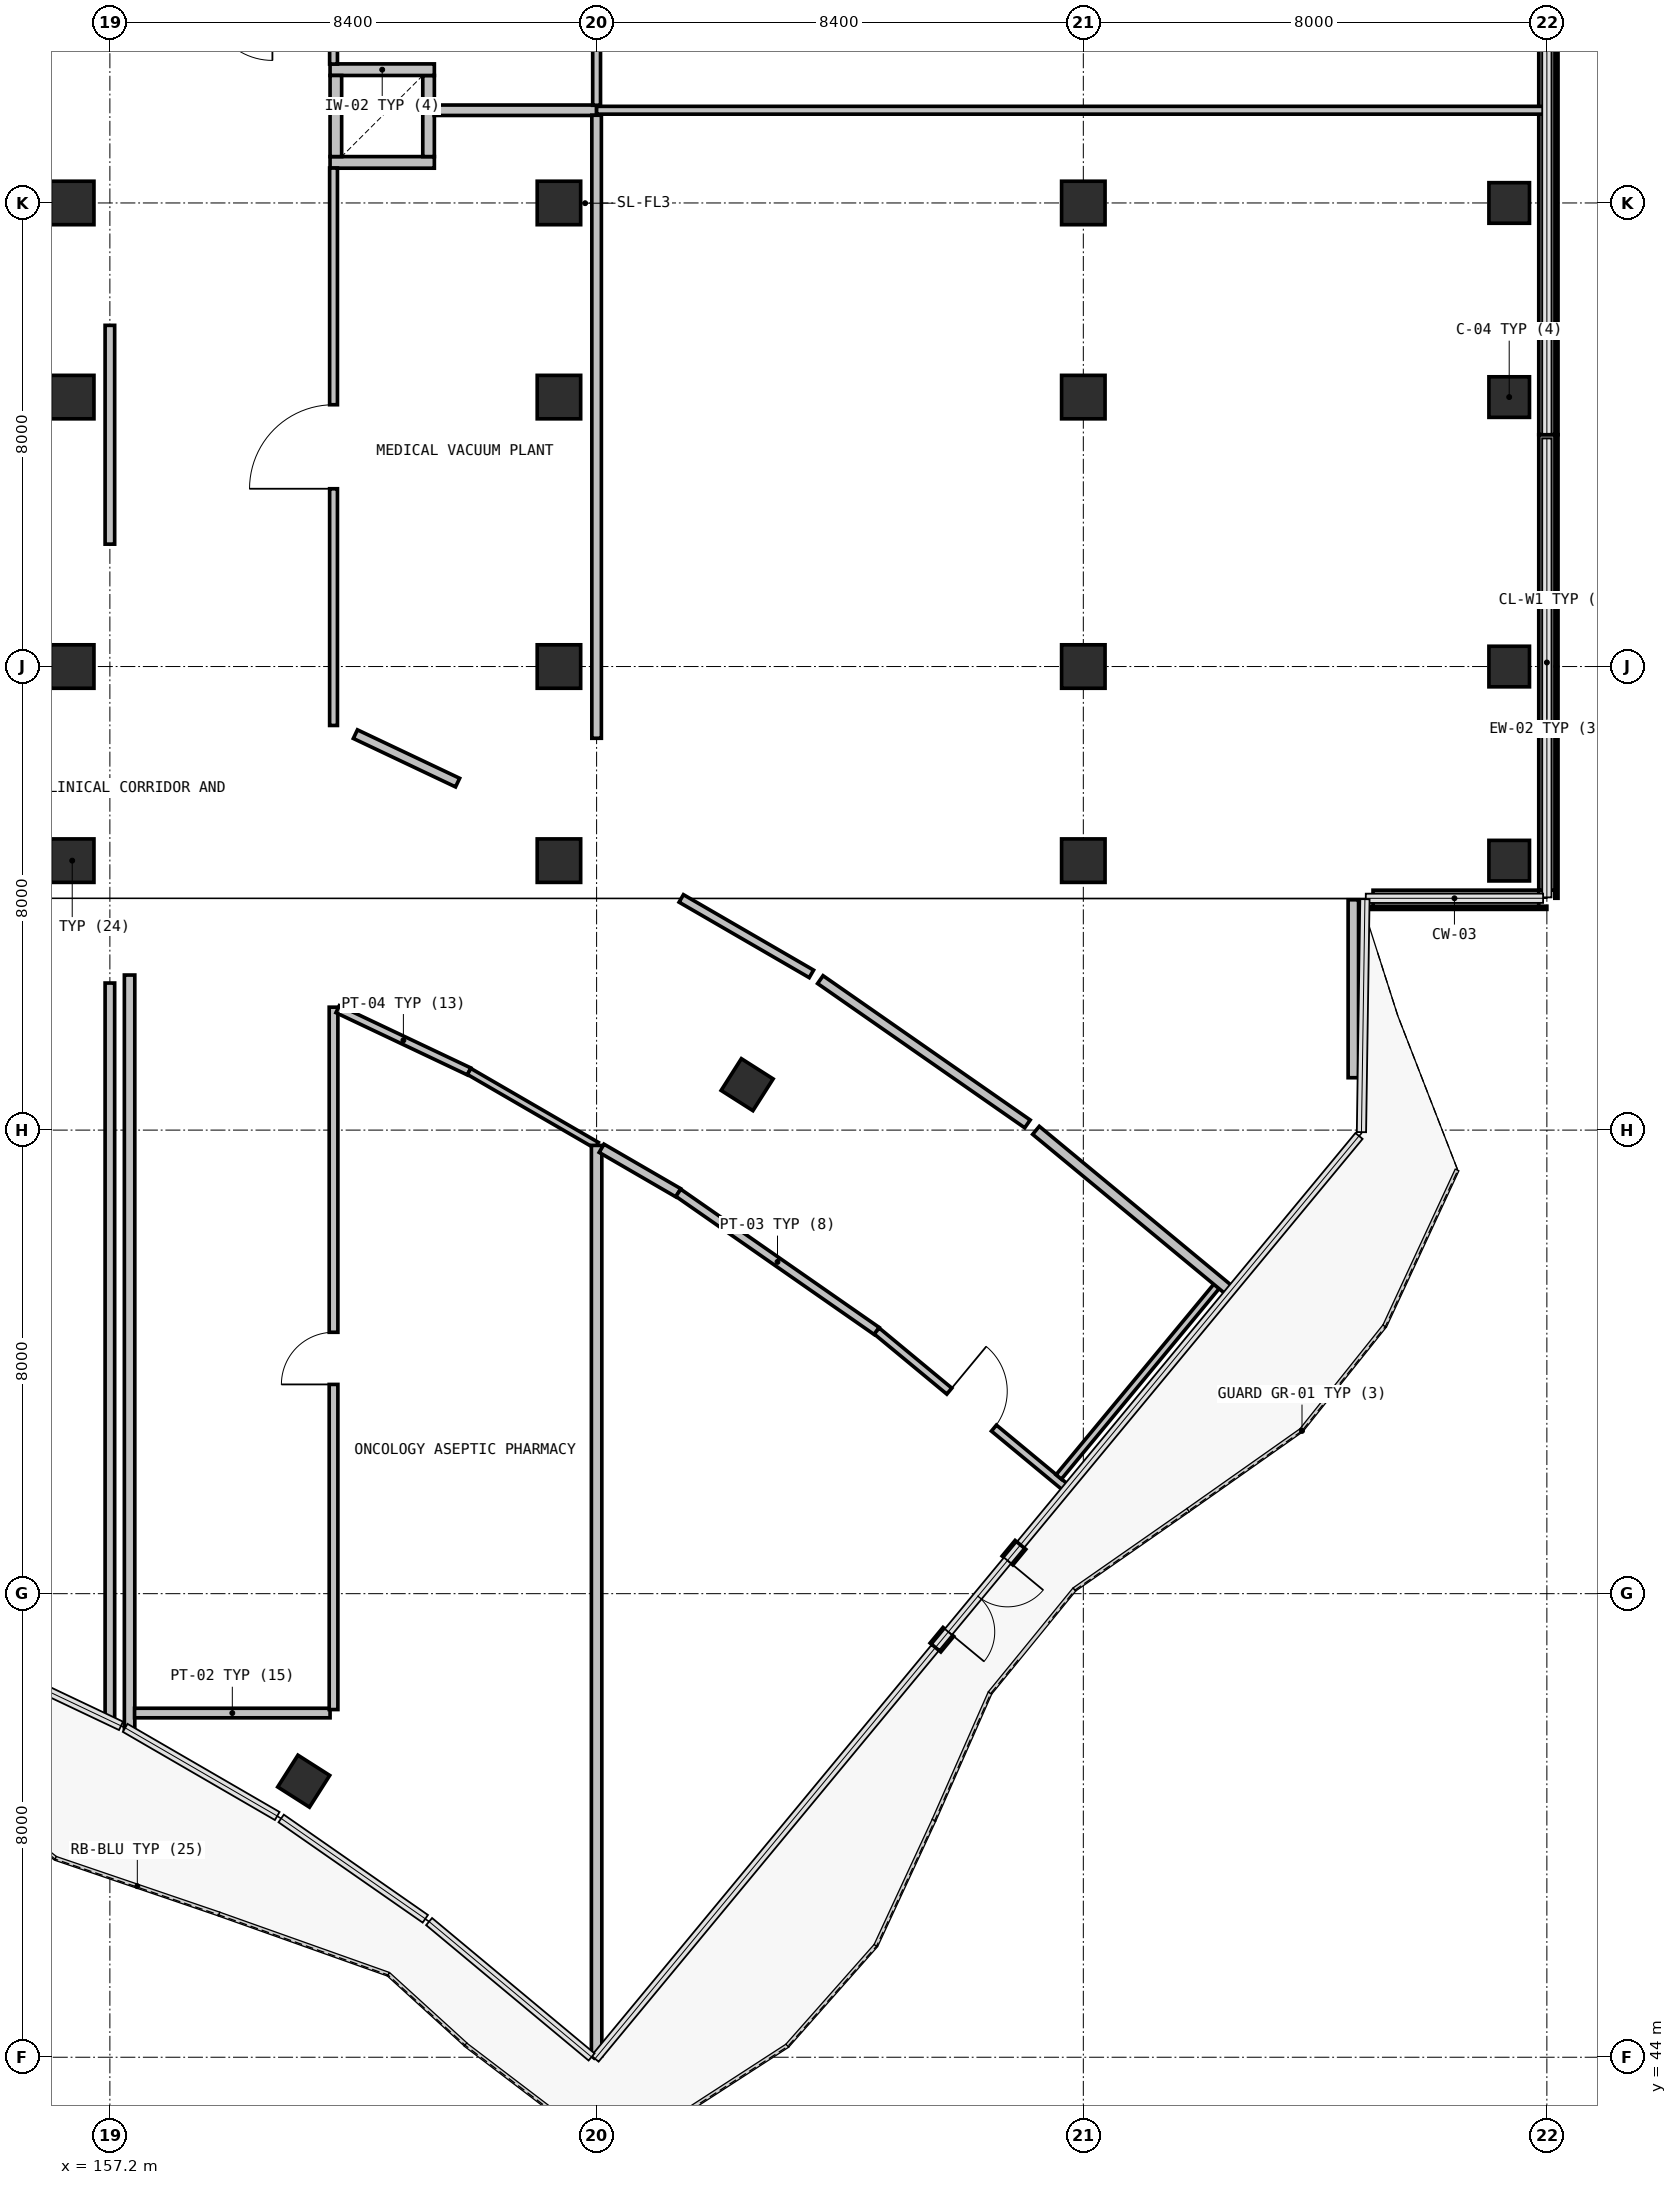
"""IFC4 building model, lengths in metres.
Left out: names, types, materials, properties, quantities, classifications, styles, units other than length and angle.
Written with IfcOpenShell. Run it as: python <this file> out.ifc"""

import sys

from ifc_helpers import new_model, si_unit, direction, frame, frame_2d, origin, origin_2d, place, context, subcontext, project, spatial, rectangle, extrude, element, fill, save


model = new_model("IFC4")
c1 = context("Model", 3, precision=1e-05, world=origin(), true_north=direction((0.0, 1.0)))
c2 = subcontext(c1, "Body", "Model", "MODEL_VIEW")
j1 = project(units=[si_unit("LENGTHUNIT", "METRE"), si_unit("PLANEANGLEUNIT", "RADIAN")], contexts=[c1])
p1 = place(None, origin())
s1 = spatial("IfcSite", under=j1, at=p1, CompositionType="ELEMENT")
p2 = place(p1, origin())
s2 = spatial("IfcBuilding", under=s1, at=p2, CompositionType="ELEMENT")
p3 = place(p2, frame((0.0, 0.0, 15.0)))
s3 = spatial("IfcBuildingStorey", under=s2, at=p3, CompositionType="ELEMENT", Elevation=15.0)
for number, where, z_axis, x_axis in (
    (1, (156.55, 64.65, 0.0), (0.0, 0.0, 1.0), (1.0, 0.0, 0.0)),
    (2, (156.55, 68.0, 0.0), (0.0, 0.0, 1.0), (1.0, 0.0, 0.0)),
    (3, (156.55, 72.65, 0.0), (0.0, 0.0, 1.0), (1.0, 0.0, 0.0)),
    (4, (156.55, 76.0, 0.0), (0.0, 0.0, 1.0), (1.0, 0.0, 0.0)),
    (5, (164.95, 64.65, 0.0), (0.0, 0.0, 1.0), (1.0, 0.0, 0.0)),
    (6, (164.95, 68.0, 0.0), (0.0, 0.0, 1.0), (1.0, 0.0, 0.0)),
    (7, (164.95, 72.65, 0.0), (0.0, 0.0, 1.0), (1.0, 0.0, 0.0)),
    (8, (164.95, 76.0, 0.0), (0.0, 0.0, 1.0), (1.0, 0.0, 0.0)),
    (9, (174.0, 64.65, 0.0), (0.0, 0.0, 1.0), (1.0, 0.0, 0.0)),
    (10, (174.0, 68.0, 0.0), (0.0, 0.0, 1.0), (1.0, 0.0, 0.0)),
    (11, (174.0, 72.65, 0.0), (0.0, 0.0, 1.0), (1.0, 0.0, 0.0)),
    (12, (174.0, 76.0, 0.0), (0.0, 0.0, 1.0), (1.0, 0.0, 0.0)),
):
    element("IfcColumn", number, at=place(p3, frame(where, z_axis=z_axis, x_axis=x_axis)), inside=s3, PredefinedType="COLUMN", context=c2, shape_type="SweptSolid", body=[
        extrude(rectangle(XDim=0.75, YDim=0.75, at=origin_2d()), origin(), (0.0, 0.0, 1.0), 4.2),
    ])
for number, where, z_axis, x_axis in (
    (13, (181.35, 64.65, 0.0), (0.0, 0.0, 1.0), (1.0, 0.0, 0.0)),
    (14, (181.35, 68.0, 0.0), (0.0, 0.0, 1.0), (1.0, 0.0, 0.0)),
    (15, (181.35, 72.65, 0.0), (0.0, 0.0, 1.0), (1.0, 0.0, 0.0)),
    (16, (181.35, 76.0, 0.0), (0.0, 0.0, 1.0), (1.0, 0.0, 0.0)),
):
    element("IfcColumn", number, at=place(p3, frame(where, z_axis=z_axis, x_axis=x_axis)), inside=s3, PredefinedType="COLUMN", context=c2, shape_type="SweptSolid", body=[
        extrude(rectangle(XDim=0.7, YDim=0.7, at=origin_2d()), origin(), (0.0, 0.0, 1.0), 4.2),
    ])
for number, where, z_axis, x_axis in (
    (17, (168.198, 60.784, 0.0), (0.0, 0.0, 1.0), (0.537, 0.844, 0.0)),
    (18, (160.545, 48.764, 0.0), (0.0, 0.0, 1.0), (0.537, 0.844, 0.0)),
):
    element("IfcColumn", number, at=place(p3, frame(where, z_axis=z_axis, x_axis=x_axis)), inside=s3, PredefinedType="COLUMN", context=c2, shape_type="SweptSolid", body=[
        extrude(rectangle(XDim=0.65, YDim=0.65, at=origin_2d()), origin(), (0.0, 0.0, 1.0), 3.91),
    ])
p4 = place(p3, frame((182.0, 79.999, 0.0), z_axis=(0.0, 0.0, 1.0), x_axis=(0.0, -1.0, 0.0)))
e19 = element("IfcWall", 19, at=p4, inside=s3, PredefinedType="SOLIDWALL", context=c2, shape_type="SweptSolid", body=[
    extrude(rectangle(XDim=7.996, YDim=0.28, at=frame_2d((3.998, 0.0))), origin(), (0.0, 0.0, 1.0), 0.94),
])
p5 = place(p3, frame((182.0, 71.999, 0.0), z_axis=(0.0, 0.0, 1.0), x_axis=(0.0, -1.0, 0.0)))
e20 = element("IfcWall", 20, at=p5, inside=s3, PredefinedType="SOLIDWALL", context=c2, shape_type="SweptSolid", body=[
    extrude(rectangle(XDim=7.858, YDim=0.28, at=frame_2d((3.929, 0.0))), origin(), (0.0, 0.0, 1.0), 0.94),
])
p6 = place(p3, frame((181.86, 64.001, 0.0), z_axis=(0.0, 0.0, 1.0), x_axis=(-0.999999941708, -0.000341442575, 0.0)))
e21 = element("IfcWall", 21, at=p6, inside=s3, PredefinedType="SOLIDWALL", context=c2, shape_type="SweptSolid", body=[
    extrude(rectangle(XDim=2.86, YDim=0.28, at=frame_2d((1.43, 0.0))), origin(), (0.0, 0.0, 1.0), 0.94),
])
p7 = place(p3, frame((172.915, 52.842, 0.0), z_axis=(0.0, 0.0, 1.0), x_axis=(-0.637926137679, -0.770097554123, 0.0)))
e22 = element("IfcWall", 22, at=p7, inside=s3, PredefinedType="SOLIDWALL", context=c2, shape_type="SweptSolid", body=[
    extrude(rectangle(XDim=2.3, YDim=0.24, at=frame_2d((1.15, 0.0))), origin(), (0.0, 0.0, 1.0), 2.32),
])
p8 = place(p7, frame((0.35, 0.0, 0.0)))
e23 = element("IfcOpeningElement", 23, at=p8, cuts=e22, PredefinedType="OPENING", context=c2, shape_type="SweptSolid", body=[
    extrude(rectangle(XDim=1.6, YDim=2.2, at=frame_2d((0.8, 1.1))), frame((0.0, 0.13, 0.0), z_axis=(0.0, -1.0, 0.0), x_axis=(1.0, 0.0, 0.0)), (0.0, 0.0, 1.0), 0.26),
])
p9 = place(p3, frame((161.0, 76.7, 0.0), z_axis=(0.0, 0.0, 1.0), x_axis=(1.0, 0.0, 0.0)))
e24 = element("IfcWall", 24, at=p9, inside=s3, PredefinedType="SOLIDWALL", context=c2, shape_type="SweptSolid", body=[
    extrude(rectangle(XDim=1.8, YDim=0.2, at=frame_2d((0.9, 0.0))), origin(), (0.0, 0.0, 1.0), 3.895),
])
p10 = place(p3, frame((162.7, 76.8, 0.0), z_axis=(0.0, 0.0, 1.0), x_axis=(0.0, 1.0, 0.0)))
e25 = element("IfcWall", 25, at=p10, inside=s3, PredefinedType="SOLIDWALL", context=c2, shape_type="SweptSolid", body=[
    extrude(rectangle(XDim=1.4, YDim=0.2, at=frame_2d((0.7, 0.0))), origin(), (0.0, 0.0, 1.0), 3.895),
])
p11 = place(p3, frame((162.8, 78.3, 0.0), z_axis=(0.0, 0.0, 1.0), x_axis=(-1.0, 0.0, 0.0)))
e26 = element("IfcWall", 26, at=p11, inside=s3, PredefinedType="SOLIDWALL", context=c2, shape_type="SweptSolid", body=[
    extrude(rectangle(XDim=1.8, YDim=0.2, at=frame_2d((0.9, 0.0))), origin(), (0.0, 0.0, 1.0), 3.895),
])
p12 = place(p3, frame((161.1, 78.2, 0.0), z_axis=(0.0, 0.0, 1.0), x_axis=(0.0, -1.0, 0.0)))
e27 = element("IfcWall", 27, at=p12, inside=s3, PredefinedType="SOLIDWALL", context=c2, shape_type="SweptSolid", body=[
    extrude(rectangle(XDim=1.4, YDim=0.2, at=frame_2d((0.7, 0.0))), origin(), (0.0, 0.0, 1.0), 3.895),
])
p13 = place(p3, frame((157.2, 62.538, 0.0), z_axis=(0.0, 0.0, 1.0), x_axis=(0.0, -1.0, 0.0)))
e28 = element("IfcWall", 28, at=p13, inside=s3, PredefinedType="PARTITIONING", context=c2, shape_type="SweptSolid", body=[
    extrude(rectangle(XDim=12.715, YDim=0.165, at=frame_2d((6.357, 0.0))), origin(), (0.0, 0.0, 1.0), 3.895),
])
p14 = place(p3, frame((157.2, 73.888, 0.0), z_axis=(0.0, 0.0, 1.0), x_axis=(0.0, -1.0, 0.0)))
e29 = element("IfcWall", 29, at=p14, inside=s3, PredefinedType="PARTITIONING", context=c2, shape_type="SweptSolid", body=[
    extrude(rectangle(XDim=3.776, YDim=0.165, at=frame_2d((1.888, 0.0))), origin(), (0.0, 0.0, 1.0), 3.895),
])
p15 = place(p3, frame((157.54, 62.676, 0.0), z_axis=(0.0, 0.0, 1.0), x_axis=(0.0, -1.0, 0.0)))
e30 = element("IfcWall", 30, at=p15, inside=s3, PredefinedType="PARTITIONING", context=c2, shape_type="SweptSolid", body=[
    extrude(rectangle(XDim=13.023, YDim=0.18, at=frame_2d((6.511, 0.0))), origin(), (0.0, 0.0, 1.0), 3.895),
])
p16 = place(p3, frame((157.626, 49.94, 0.0), z_axis=(0.0, 0.0, 1.0), x_axis=(1.0, 0.0, 0.0)))
e31 = element("IfcWall", 31, at=p16, inside=s3, PredefinedType="PARTITIONING", context=c2, shape_type="SweptSolid", body=[
    extrude(rectangle(XDim=3.374, YDim=0.165, at=frame_2d((1.687, 0.0))), origin(), (0.0, 0.0, 1.0), 3.895),
])
p17 = place(p3, frame((161.06, 50.0, 0.0), z_axis=(0.0, 0.0, 1.0), x_axis=(0.0, 1.0, 0.0)))
e32 = element("IfcWall", 32, at=p17, inside=s3, PredefinedType="PARTITIONING", context=c2, shape_type="SweptSolid", body=[
    extrude(rectangle(XDim=12.121, YDim=0.15, at=frame_2d((6.061, 0.0))), origin(), (0.0, 0.0, 1.0), 3.895),
])
p18 = place(p17, frame((5.611, 0.0, 0.0)))
e33 = element("IfcOpeningElement", 33, at=p18, cuts=e32, PredefinedType="OPENING", context=c2, shape_type="SweptSolid", body=[
    extrude(rectangle(XDim=0.9, YDim=2.1, at=frame_2d((0.45, 1.05))), frame((0.0, 0.085, 0.0), z_axis=(0.0, -1.0, 0.0), x_axis=(1.0, 0.0, 0.0)), (0.0, 0.0, 1.0), 0.17),
])
p19 = place(p3, frame((161.131, 62.087, 0.0), z_axis=(0.0, 0.0, 1.0), x_axis=(0.903698232971, -0.428169947247, 0.0)))
e34 = element("IfcWall", 34, at=p19, inside=s3, PredefinedType="PARTITIONING", context=c2, shape_type="SweptSolid", body=[
    extrude(rectangle(XDim=2.51, YDim=0.135, at=frame_2d((1.255, 0.0))), origin(), (0.0, 0.0, 1.0), 3.895),
])
p20 = place(p3, frame((163.4, 61.012, 0.0), z_axis=(0.0, 0.0, 1.0), x_axis=(0.865071180383, -0.501649133231, 0.0)))
e35 = element("IfcWall", 35, at=p20, inside=s3, PredefinedType="PARTITIONING", context=c2, shape_type="SweptSolid", body=[
    extrude(rectangle(XDim=2.543, YDim=0.12, at=frame_2d((1.272, 0.0))), origin(), (0.0, 0.0, 1.0), 3.895),
])
p21 = place(p3, frame((165.6, 59.736, 0.0), z_axis=(0.0, 0.0, 1.0), x_axis=(0.0, -1.0, 0.0)))
e36 = element("IfcWall", 36, at=p21, inside=s3, PredefinedType="PARTITIONING", context=c2, shape_type="SweptSolid", body=[
    extrude(rectangle(XDim=15.71, YDim=0.18, at=frame_2d((7.855, 0.0))), origin(), (0.0, 0.0, 1.0), 3.895),
])
p22 = place(p3, frame((163.201, 65.997, 0.0), z_axis=(0.0, 0.0, 1.0), x_axis=(-0.903658874167, 0.428253008325, 0.0)))
e37 = element("IfcWall", 37, at=p22, inside=s3, PredefinedType="PARTITIONING", context=c2, shape_type="SweptSolid", body=[
    extrude(rectangle(XDim=1.952, YDim=0.165, at=frame_2d((0.976, 0.0))), origin(), (0.0, 0.0, 1.0), 3.895),
])
p23 = place(p3, frame((161.06, 66.983, 0.0), z_axis=(0.0, 0.0, 1.0), x_axis=(0.0, 1.0, 0.0)))
e38 = element("IfcWall", 38, at=p23, inside=s3, PredefinedType="PARTITIONING", context=c2, shape_type="SweptSolid", body=[
    extrude(rectangle(XDim=9.62, YDim=0.135, at=frame_2d((4.81, 0.0))), origin(), (0.0, 0.0, 1.0), 3.895),
])
p24 = place(p23, frame((4.085, 0.0, 0.0)))
e39 = element("IfcOpeningElement", 39, at=p24, cuts=e38, PredefinedType="OPENING", context=c2, shape_type="SweptSolid", body=[
    extrude(rectangle(XDim=1.45, YDim=2.15, at=frame_2d((0.725, 1.075))), frame((0.0, 0.077, 0.0), z_axis=(0.0, -1.0, 0.0), x_axis=(1.0, 0.0, 0.0)), (0.0, 0.0, 1.0), 0.155),
])
p25 = place(p3, frame((162.797, 77.6, 0.0), z_axis=(0.0, 0.0, 1.0), x_axis=(1.0, 0.0, 0.0)))
e40 = element("IfcWall", 40, at=p25, inside=s3, PredefinedType="PARTITIONING", context=c2, shape_type="SweptSolid", body=[
    extrude(rectangle(XDim=2.803, YDim=0.18, at=frame_2d((1.401, 0.0))), origin(), (0.0, 0.0, 1.0), 3.895),
])
p26 = place(p3, frame((165.6, 77.514, 0.0), z_axis=(0.0, 0.0, 1.0), x_axis=(0.0, -1.0, 0.0)))
e41 = element("IfcWall", 41, at=p26, inside=s3, PredefinedType="PARTITIONING", context=c2, shape_type="SweptSolid", body=[
    extrude(rectangle(XDim=10.752, YDim=0.165, at=frame_2d((5.376, 0.0))), origin(), (0.0, 0.0, 1.0), 3.895),
])
p27 = place(p3, frame((178.66, 63.975, 0.0), z_axis=(0.0, 0.0, 1.0), x_axis=(0.0, -1.0, 0.0)))
e42 = element("IfcWall", 42, at=p27, inside=s3, PredefinedType="PARTITIONING", context=c2, shape_type="SweptSolid", body=[
    extrude(rectangle(XDim=3.071, YDim=0.18, at=frame_2d((1.536, 0.0))), origin(), (0.0, 0.0, 1.0), 3.895),
])
p28 = place(p3, frame((165.686, 59.686, 0.0), z_axis=(0.0, 0.0, 1.0), x_axis=(0.864985497408, -0.501796860565, 0.0)))
e43 = element("IfcWall", 43, at=p28, inside=s3, PredefinedType="PARTITIONING", context=c2, shape_type="SweptSolid", body=[
    extrude(rectangle(XDim=1.531, YDim=0.165, at=frame_2d((0.765, 0.0))), origin(), (0.0, 0.0, 1.0), 3.895),
])
p29 = place(p3, frame((167.01, 58.918, 0.0), z_axis=(0.0, 0.0, 1.0), x_axis=(0.820562806153, -0.571556367437, 0.0)))
e44 = element("IfcWall", 44, at=p29, inside=s3, PredefinedType="PARTITIONING", context=c2, shape_type="SweptSolid", body=[
    extrude(rectangle(XDim=4.173, YDim=0.15, at=frame_2d((2.086, 0.0))), origin(), (0.0, 0.0, 1.0), 3.895),
])
p30 = place(p3, frame((170.434, 56.533, 0.0), z_axis=(0.0, 0.0, 1.0), x_axis=(0.770184287696, -0.637821419353, 0.0)))
e45 = element("IfcWall", 45, at=p30, inside=s3, PredefinedType="PARTITIONING", context=c2, shape_type="SweptSolid", body=[
    extrude(rectangle(XDim=4.253, YDim=0.135, at=frame_2d((2.127, 0.0))), origin(), (0.0, 0.0, 1.0), 3.895),
])
p31 = place(p30, frame((1.627, 0.0, 0.0)))
e46 = element("IfcOpeningElement", 46, at=p31, cuts=e45, PredefinedType="OPENING", context=c2, shape_type="SweptSolid", body=[
    extrude(rectangle(XDim=1.0, YDim=2.15, at=frame_2d((0.5, 1.075))), frame((0.0, 0.077, 0.0), z_axis=(0.0, -1.0, 0.0), x_axis=(1.0, 0.0, 0.0)), (0.0, 0.0, 1.0), 0.155),
])
p32 = place(p3, frame((173.575, 54.014, 0.0), z_axis=(0.0, 0.0, 1.0), x_axis=(0.637654919924, 0.770322142416, 0.0)))
e47 = element("IfcWall", 47, at=p32, inside=s3, PredefinedType="PARTITIONING", context=c2, shape_type="SweptSolid", body=[
    extrude(rectangle(XDim=4.297, YDim=0.12, at=frame_2d((2.148, 0.0))), origin(), (0.0, 0.0, 1.0), 3.895),
])
p33 = place(p3, frame((176.53, 57.225, 0.0), z_axis=(0.0, 0.0, 1.0), x_axis=(-0.770266784752, 0.637721789112, 0.0)))
e48 = element("IfcWall", 48, at=p33, inside=s3, PredefinedType="PARTITIONING", context=c2, shape_type="SweptSolid", body=[
    extrude(rectangle(XDim=4.345, YDim=0.18, at=frame_2d((2.173, 0.0))), origin(), (0.0, 0.0, 1.0), 3.895),
])
p34 = place(p3, frame((173.036, 60.107, 0.0), z_axis=(0.0, 0.0, 1.0), x_axis=(-0.820574971601, 0.571538901547, 0.0)))
e49 = element("IfcWall", 49, at=p34, inside=s3, PredefinedType="PARTITIONING", context=c2, shape_type="SweptSolid", body=[
    extrude(rectangle(XDim=4.357, YDim=0.165, at=frame_2d((2.178, 0.0))), origin(), (0.0, 0.0, 1.0), 3.895),
])
p35 = place(p3, frame((169.307, 62.696, 0.0), z_axis=(0.0, 0.0, 1.0), x_axis=(-0.86512994763, 0.501547778097, 0.0)))
e50 = element("IfcWall", 50, at=p35, inside=s3, PredefinedType="PARTITIONING", context=c2, shape_type="SweptSolid", body=[
    extrude(rectangle(XDim=2.596, YDim=0.15, at=frame_2d((1.298, 0.0))), origin(), (0.0, 0.0, 1.0), 3.895),
])
p36 = place(p3, frame((165.6, 77.6, 0.0), z_axis=(0.0, 0.0, 1.0), x_axis=(1.0, 0.0, 0.0)))
e51 = element("IfcWall", 51, at=p36, inside=s3, PredefinedType="PARTITIONING", context=c2, shape_type="SweptSolid", body=[
    extrude(rectangle(XDim=16.358, YDim=0.135, at=frame_2d((8.179, 0.0))), origin(), (0.0, 0.0, 1.0), 3.895),
])
p37 = place(p3, frame((161.06, 78.397, 0.0), z_axis=(0.0, 0.0, 1.0), x_axis=(0.0, 1.0, 0.0)))
e52 = element("IfcWall", 52, at=p37, inside=s3, PredefinedType="PARTITIONING", context=c2, shape_type="SweptSolid", body=[
    extrude(rectangle(XDim=1.103, YDim=0.135, at=frame_2d((0.552, 0.0))), origin(), (0.0, 0.0, 1.0), 3.895),
])
p38 = place(p3, frame((165.6, 80.893, 0.0), z_axis=(0.0, 0.0, 1.0), x_axis=(0.0, -1.0, 0.0)))
e53 = element("IfcWall", 53, at=p38, inside=s3, PredefinedType="PARTITIONING", context=c2, shape_type="SweptSolid", body=[
    extrude(rectangle(XDim=3.207, YDim=0.135, at=frame_2d((1.604, 0.0))), origin(), (0.0, 0.0, 1.0), 3.895),
])
p39 = place(p8, origin())
e54 = element("IfcDoor", 54, at=p39, inside=s3, OperationType="DOUBLE_DOOR_SINGLE_SWING", PredefinedType="DOOR", context=c2, shape_type="SweptSolid", body=[
    extrude(rectangle(XDim=1.6, YDim=2.2, at=frame_2d((0.8, 1.1))), frame((0.0, 0.025, 0.0), z_axis=(0.0, -1.0, 0.0), x_axis=(1.0, 0.0, 0.0)), (0.0, 0.0, 1.0), 0.05),
])
fill(e23, e54)
p40 = place(p18, origin())
e55 = element("IfcDoor", 55, at=p40, inside=s3, OperationType="SINGLE_SWING_RIGHT", PredefinedType="DOOR", context=c2, shape_type="SweptSolid", body=[
    extrude(rectangle(XDim=0.9, YDim=2.1, at=frame_2d((0.45, 1.05))), frame((0.0, 0.025, 0.0), z_axis=(0.0, -1.0, 0.0), x_axis=(1.0, 0.0, 0.0)), (0.0, 0.0, 1.0), 0.05),
])
fill(e33, e55)
p41 = place(p24, origin())
e56 = element("IfcDoor", 56, at=p41, inside=s3, OperationType="SINGLE_SWING_LEFT", PredefinedType="DOOR", context=c2, shape_type="SweptSolid", body=[
    extrude(rectangle(XDim=1.45, YDim=2.15, at=frame_2d((0.725, 1.075))), frame((0.0, 0.025, 0.0), z_axis=(0.0, -1.0, 0.0), x_axis=(1.0, 0.0, 0.0)), (0.0, 0.0, 1.0), 0.05),
])
fill(e39, e56)
p42 = place(p31, origin())
e57 = element("IfcDoor", 57, at=p42, inside=s3, OperationType="SINGLE_SWING_RIGHT", PredefinedType="DOOR", context=c2, shape_type="SweptSolid", body=[
    extrude(rectangle(XDim=1.0, YDim=2.15, at=frame_2d((0.5, 1.075))), frame((0.0, 0.025, 0.0), z_axis=(0.0, -1.0, 0.0), x_axis=(1.0, 0.0, 0.0)), (0.0, 0.0, 1.0), 0.05),
])
fill(e46, e57)
save(model, sys.argv[1])
